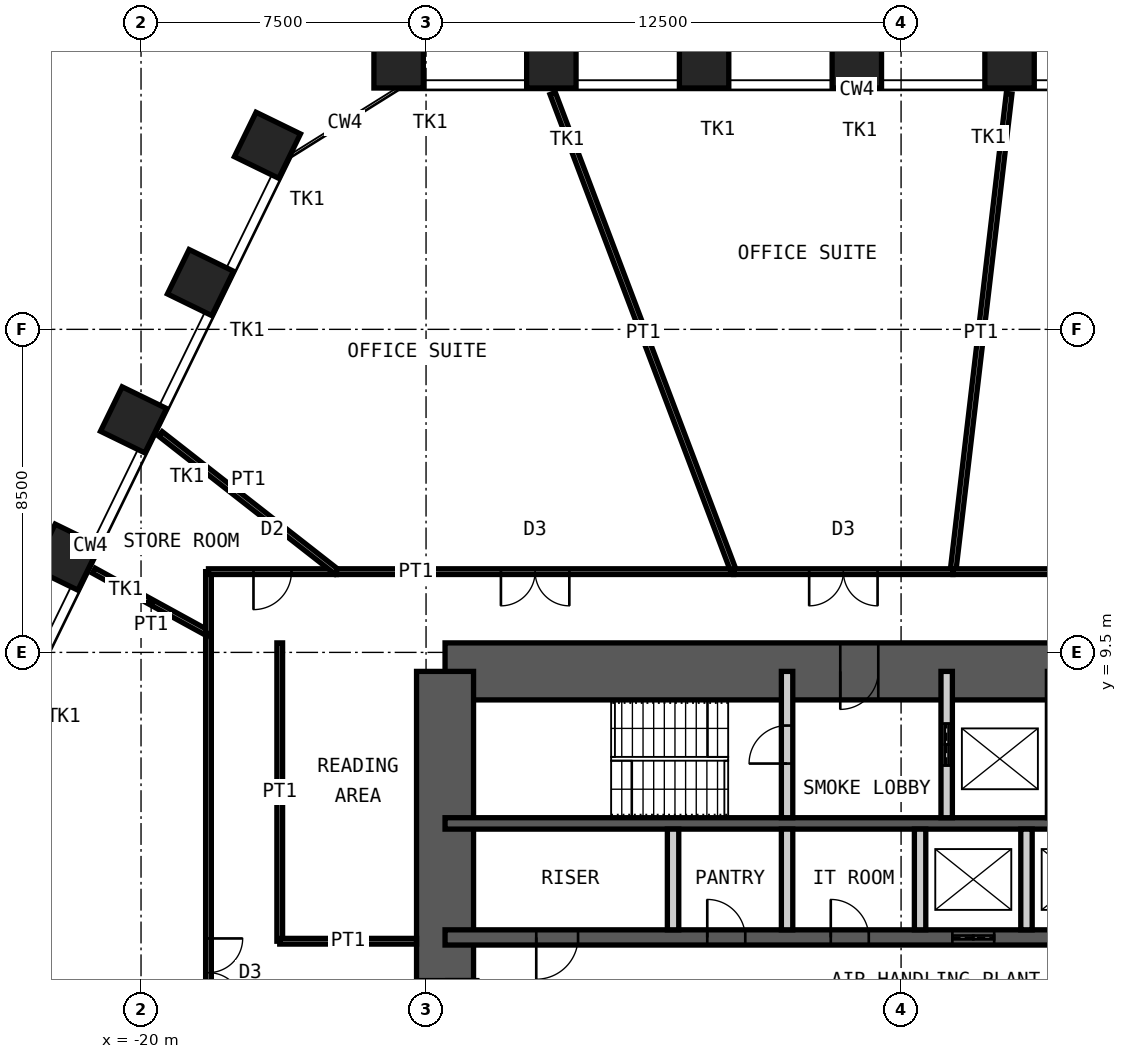
"""IFC4 building model, lengths in metres.
Left out: names, types, materials, properties, quantities, classifications, styles, units other than length and angle.
Written with IfcOpenShell. Run it as: python <this file> out.ifc"""

import sys

from ifc_helpers import new_model, si_unit, direction, frame, frame_2d, origin, origin_2d, place, context, subcontext, project, spatial, rectangle, hollow_rectangle, extrude, element, fill, save


model = new_model("IFC4")
c1 = context("Model", 3, precision=1e-05, world=origin(), true_north=direction((0.0, 1.0)))
c2 = subcontext(c1, "Body", "Model", "MODEL_VIEW")
j1 = project(units=[si_unit("LENGTHUNIT", "METRE"), si_unit("PLANEANGLEUNIT", "RADIAN")], contexts=[c1])
p1 = place(None, origin())
s1 = spatial("IfcSite", under=j1, at=p1, CompositionType="ELEMENT")
p2 = place(p1, origin())
s2 = spatial("IfcBuilding", under=s1, at=p2, CompositionType="ELEMENT")
p3 = place(p2, frame((0.0, 0.0, 170.2)))
s3 = spatial("IfcBuildingStorey", under=s2, at=p3, CompositionType="ELEMENT", Elevation=170.2)
for number, where, z_axis, x_axis in (
    (1, (-13.222, 25.0, 0.0), (0.0, 0.0, 1.0), (-1.0, 0.0, 0.0)),
    (2, (-9.203, 25.0, 0.0), (0.0, 0.0, 1.0), (-1.0, 0.0, 0.0)),
    (3, (-5.184, 25.0, 0.0), (0.0, 0.0, 1.0), (-1.0, 0.0, 0.0)),
    (4, (-1.165, 25.0, 0.0), (0.0, 0.0, 1.0), (-1.0, 0.0, 0.0)),
    (5, (2.854, 25.0, 0.0), (0.0, 0.0, 1.0), (-1.0, 0.0, 0.0)),
    (6, (-21.959, 12.006, 0.0), (0.0, 0.0, 1.0), (-0.438, -0.899, 0.0)),
    (7, (-20.198, 15.618, 0.0), (0.0, 0.0, 1.0), (-0.438, -0.899, 0.0)),
    (8, (-18.436, 19.23, 0.0), (0.0, 0.0, 1.0), (-0.438, -0.899, 0.0)),
    (9, (-16.674, 22.843, 0.0), (0.0, 0.0, 1.0), (-0.438, -0.899, 0.0)),
):
    element("IfcColumn", number, at=place(p3, frame(where, z_axis=z_axis, x_axis=x_axis)), inside=s3, PredefinedType="COLUMN", context=c2, shape_type="SweptSolid", body=[
        extrude(hollow_rectangle(XDim=1.3, YDim=1.3, WallThickness=0.1, at=origin_2d()), origin(), (0.0, 0.0, 1.0), 4.2),
    ])
p4 = place(p3, frame((-12.0, 9.0, 0.0), z_axis=(0.0, 0.0, 1.0), x_axis=(1.0, 0.0, 0.0)))
e10 = element("IfcWall", 10, at=p4, inside=s3, PredefinedType="SHEAR", context=c2, shape_type="SweptSolid", body=[
    extrude(rectangle(XDim=24.0, YDim=1.5, at=frame_2d((12.0, 0.0))), origin(), (0.0, 0.0, 1.0), 4.2),
])
p5 = place(p4, frame((10.4, 0.0, 0.0)))
e11 = element("IfcOpeningElement", 11, at=p5, cuts=e10, PredefinedType="OPENING", context=c2, shape_type="SweptSolid", body=[
    extrude(rectangle(XDim=1.0, YDim=2.1, at=frame_2d((0.5, 1.05))), frame((0.0, 0.76, 0.0), z_axis=(0.0, -1.0, 0.0), x_axis=(1.0, 0.0, 0.0)), (0.0, 0.0, 1.0), 1.52),
])
p6 = place(p4, frame((17.6, 0.0, 0.0)))
e12 = element("IfcOpeningElement", 12, at=p6, cuts=e10, PredefinedType="OPENING", context=c2, shape_type="SweptSolid", body=[
    extrude(rectangle(XDim=0.9, YDim=2.1, at=frame_2d((0.45, 1.05))), frame((0.0, 0.76, 0.0), z_axis=(0.0, -1.0, 0.0), x_axis=(1.0, 0.0, 0.0)), (0.0, 0.0, 1.0), 1.52),
])
p7 = place(p4, frame((21.9, 0.0, 0.0)))
e13 = element("IfcOpeningElement", 13, at=p7, cuts=e10, PredefinedType="OPENING", context=c2, shape_type="SweptSolid", body=[
    extrude(rectangle(XDim=0.9, YDim=2.1, at=frame_2d((0.45, 1.05))), frame((0.0, 0.76, 0.0), z_axis=(0.0, -1.0, 0.0), x_axis=(1.0, 0.0, 0.0)), (0.0, 0.0, 1.0), 1.52),
])
p8 = place(p3, frame((-12.0, -9.0, 0.0), z_axis=(0.0, 0.0, 1.0), x_axis=(0.0, 1.0, 0.0)))
e14 = element("IfcWall", 14, at=p8, inside=s3, PredefinedType="SHEAR", context=c2, shape_type="SweptSolid", body=[
    extrude(rectangle(XDim=18.0, YDim=1.5, at=frame_2d((9.0, 0.0))), origin(), (0.0, 0.0, 1.0), 4.2),
])
p9 = place(p8, frame((8.1, 0.0, 0.0)))
e15 = element("IfcOpeningElement", 15, at=p9, cuts=e14, PredefinedType="OPENING", context=c2, shape_type="SweptSolid", body=[
    extrude(rectangle(XDim=1.8, YDim=2.1, at=frame_2d((0.9, 1.05))), frame((0.0, 0.76, 0.0), z_axis=(0.0, -1.0, 0.0), x_axis=(1.0, 0.0, 0.0)), (0.0, 0.0, 1.0), 1.52),
])
p10 = place(p3, frame((-12.0, 5.0, 0.0), z_axis=(0.0, 0.0, 1.0), x_axis=(1.0, 0.0, 0.0)))
e16 = element("IfcWall", 16, at=p10, inside=s3, PredefinedType="SHEAR", context=c2, shape_type="SweptSolid", body=[
    extrude(rectangle(XDim=24.0, YDim=0.3, at=frame_2d((12.0, 0.0))), origin(), (0.0, 0.0, 1.0), 4.2),
])
p11 = place(p3, frame((-12.0, 2.0, 0.0), z_axis=(0.0, 0.0, 1.0), x_axis=(1.0, 0.0, 0.0)))
e17 = element("IfcWall", 17, at=p11, inside=s3, PredefinedType="SHEAR", context=c2, shape_type="SweptSolid", body=[
    extrude(rectangle(XDim=24.0, YDim=0.4, at=frame_2d((12.0, 0.0))), origin(), (0.0, 0.0, 1.0), 4.2),
])
p12 = place(p11, frame((2.4, 0.0, 0.0)))
e18 = element("IfcOpeningElement", 18, at=p12, cuts=e17, PredefinedType="OPENING", context=c2, shape_type="SweptSolid", body=[
    extrude(rectangle(XDim=1.1, YDim=2.1, at=frame_2d((0.55, 1.05))), frame((0.0, 0.21, 0.0), z_axis=(0.0, -1.0, 0.0), x_axis=(1.0, 0.0, 0.0)), (0.0, 0.0, 1.0), 0.42),
])
p13 = place(p11, frame((22.0, 0.0, 0.0)))
e19 = element("IfcOpeningElement", 19, at=p13, cuts=e17, PredefinedType="OPENING", context=c2, shape_type="SweptSolid", body=[
    extrude(rectangle(XDim=1.1, YDim=2.1, at=frame_2d((0.55, 1.05))), frame((0.0, 0.21, 0.0), z_axis=(0.0, -1.0, 0.0), x_axis=(1.0, 0.0, 0.0)), (0.0, 0.0, 1.0), 0.42),
])
p14 = place(p11, frame((10.15, 0.0, 0.0)))
e20 = element("IfcOpeningElement", 20, at=p14, cuts=e17, PredefinedType="OPENING", context=c2, shape_type="SweptSolid", body=[
    extrude(rectangle(XDim=1.0, YDim=2.1, at=frame_2d((0.5, 1.05))), frame((0.0, 0.21, 0.0), z_axis=(0.0, -1.0, 0.0), x_axis=(1.0, 0.0, 0.0)), (0.0, 0.0, 1.0), 0.42),
])
p15 = place(p11, frame((6.9, 0.0, 0.0)))
e21 = element("IfcOpeningElement", 21, at=p15, cuts=e17, PredefinedType="OPENING", context=c2, shape_type="SweptSolid", body=[
    extrude(rectangle(XDim=1.0, YDim=2.1, at=frame_2d((0.5, 1.05))), frame((0.0, 0.21, 0.0), z_axis=(0.0, -1.0, 0.0), x_axis=(1.0, 0.0, 0.0)), (0.0, 0.0, 1.0), 0.42),
])
p16 = place(p11, frame((13.35, 0.0, 0.0)))
e22 = element("IfcOpeningElement", 22, at=p16, cuts=e17, PredefinedType="OPENING", context=c2, shape_type="SweptSolid", body=[
    extrude(rectangle(XDim=1.1, YDim=2.4, at=frame_2d((0.55, 1.2))), frame((0.0, 0.21, 0.0), z_axis=(0.0, -1.0, 0.0), x_axis=(1.0, 0.0, 0.0)), (0.0, 0.0, 1.0), 0.42),
])
p17 = place(p11, frame((16.15, 0.0, 0.0)))
e23 = element("IfcOpeningElement", 23, at=p17, cuts=e17, PredefinedType="OPENING", context=c2, shape_type="SweptSolid", body=[
    extrude(rectangle(XDim=1.1, YDim=2.4, at=frame_2d((0.55, 1.2))), frame((0.0, 0.21, 0.0), z_axis=(0.0, -1.0, 0.0), x_axis=(1.0, 0.0, 0.0)), (0.0, 0.0, 1.0), 0.42),
])
p18 = place(p11, frame((18.95, 0.0, 0.0)))
e24 = element("IfcOpeningElement", 24, at=p18, cuts=e17, PredefinedType="OPENING", context=c2, shape_type="SweptSolid", body=[
    extrude(rectangle(XDim=1.1, YDim=2.4, at=frame_2d((0.55, 1.2))), frame((0.0, 0.21, 0.0), z_axis=(0.0, -1.0, 0.0), x_axis=(1.0, 0.0, 0.0)), (0.0, 0.0, 1.0), 0.42),
])
p19 = place(p3, frame((-3.0, 5.15, 0.0), z_axis=(0.0, 0.0, 1.0), x_axis=(0.0, 1.0, 0.0)))
e25 = element("IfcWall", 25, at=p19, inside=s3, PredefinedType="PARTITIONING", context=c2, shape_type="SweptSolid", body=[
    extrude(rectangle(XDim=3.85, YDim=0.3, at=frame_2d((1.925, 0.0))), origin(), (0.0, 0.0, 1.0), 3.98),
])
p20 = place(p19, frame((1.425, 0.0, 0.0)))
e26 = element("IfcOpeningElement", 26, at=p20, cuts=e25, PredefinedType="OPENING", context=c2, shape_type="SweptSolid", body=[
    extrude(rectangle(XDim=1.0, YDim=2.1, at=frame_2d((0.5, 1.05))), frame((0.0, 0.16, 0.0), z_axis=(0.0, -1.0, 0.0), x_axis=(1.0, 0.0, 0.0)), (0.0, 0.0, 1.0), 0.32),
])
p21 = place(p3, frame((1.2, 5.15, 0.0), z_axis=(0.0, 0.0, 1.0), x_axis=(0.0, 1.0, 0.0)))
e27 = element("IfcWall", 27, at=p21, inside=s3, PredefinedType="PARTITIONING", context=c2, shape_type="SweptSolid", body=[
    extrude(rectangle(XDim=3.85, YDim=0.3, at=frame_2d((1.925, 0.0))), origin(), (0.0, 0.0, 1.0), 3.98),
])
p22 = place(p21, frame((1.375, 0.0, 0.0)))
e28 = element("IfcOpeningElement", 28, at=p22, cuts=e27, PredefinedType="OPENING", context=c2, shape_type="SweptSolid", body=[
    extrude(rectangle(XDim=1.1, YDim=2.4, at=frame_2d((0.55, 1.2))), frame((0.0, 0.16, 0.0), z_axis=(0.0, -1.0, 0.0), x_axis=(1.0, 0.0, 0.0)), (0.0, 0.0, 1.0), 0.32),
])
p23 = place(p3, frame((4.0, 5.15, 0.0), z_axis=(0.0, 0.0, 1.0), x_axis=(0.0, 1.0, 0.0)))
e29 = element("IfcWall", 29, at=p23, inside=s3, PredefinedType="PARTITIONING", context=c2, shape_type="SweptSolid", body=[
    extrude(rectangle(XDim=3.85, YDim=0.3, at=frame_2d((1.925, 0.0))), origin(), (0.0, 0.0, 1.0), 3.98),
])
for number, where, z_axis, x_axis in (
    (30, (-6.0, 2.2, 0.0), (0.0, 0.0, 1.0), (0.0, 1.0, 0.0)),
    (31, (-3.0, 2.2, 0.0), (0.0, 0.0, 1.0), (0.0, 1.0, 0.0)),
    (32, (0.5, 2.2, 0.0), (0.0, 0.0, 1.0), (0.0, 1.0, 0.0)),
    (33, (3.3, 2.2, 0.0), (0.0, 0.0, 1.0), (0.0, 1.0, 0.0)),
):
    element("IfcWall", number, at=place(p3, frame(where, z_axis=z_axis, x_axis=x_axis)), inside=s3, PredefinedType="PARTITIONING", context=c2, shape_type="SweptSolid", body=[
        extrude(rectangle(XDim=2.65, YDim=0.3, at=frame_2d((1.325, 0.0))), origin(), (0.0, 0.0, 1.0), 3.98),
    ])
p24 = place(p3, frame((2.843, 24.201, 0.0), z_axis=(0.0, 0.0, 1.0), x_axis=(-0.116670084723, -0.993170726175, 0.0)))
e34 = element("IfcWall", 34, at=p24, inside=s3, PredefinedType="PARTITIONING", context=c2, shape_type="SweptSolid", body=[
    extrude(rectangle(XDim=12.662, YDim=0.15, at=frame_2d((6.331, 0.0))), origin(), (0.0, 0.0, 1.0), 2.72),
])
p25 = place(p3, frame((1.366, 11.625, 0.0), z_axis=(0.0, 0.0, 1.0), x_axis=(1.0, 0.0, 0.0)))
e35 = element("IfcWall", 35, at=p25, inside=s3, PredefinedType="PARTITIONING", context=c2, shape_type="SweptSolid", body=[
    extrude(rectangle(XDim=8.46, YDim=0.15, at=frame_2d((4.23, 0.0))), origin(), (0.0, 0.0, 1.0), 3.92),
])
p26 = place(p25, frame((3.33, 0.0, 0.0)))
e36 = element("IfcOpeningElement", 36, at=p26, cuts=e35, PredefinedType="OPENING", context=c2, shape_type="SweptSolid", body=[
    extrude(rectangle(XDim=1.8, YDim=2.4, at=frame_2d((0.9, 1.2))), frame((0.0, 0.085, 0.0), z_axis=(0.0, -1.0, 0.0), x_axis=(1.0, 0.0, 0.0)), (0.0, 0.0, 1.0), 0.17),
])
p27 = place(p3, frame((-18.225, -7.849, 0.0), z_axis=(0.0, 0.0, 1.0), x_axis=(0.0, 1.0, 0.0)))
e37 = element("IfcWall", 37, at=p27, inside=s3, PredefinedType="PARTITIONING", context=c2, shape_type="SweptSolid", body=[
    extrude(rectangle(XDim=17.845, YDim=0.15, at=frame_2d((8.922, 0.0))), origin(), (0.0, 0.0, 1.0), 3.92),
])
p28 = place(p27, frame((8.022, 0.0, 0.0)))
e38 = element("IfcOpeningElement", 38, at=p28, cuts=e37, PredefinedType="OPENING", context=c2, shape_type="SweptSolid", body=[
    extrude(rectangle(XDim=1.8, YDim=2.4, at=frame_2d((0.9, 1.2))), frame((0.0, 0.085, 0.0), z_axis=(0.0, -1.0, 0.0), x_axis=(1.0, 0.0, 0.0)), (0.0, 0.0, 1.0), 0.17),
])
p29 = place(p3, frame((-21.242, 11.651, 0.0), z_axis=(0.0, 0.0, 1.0), x_axis=(0.876768023831, -0.480913539409, 0.0)))
e39 = element("IfcWall", 39, at=p29, inside=s3, PredefinedType="PARTITIONING", context=c2, shape_type="SweptSolid", body=[
    extrude(rectangle(XDim=3.441, YDim=0.15, at=frame_2d((1.721, 0.0))), origin(), (0.0, 0.0, 1.0), 2.72),
])
p30 = place(p3, frame((-18.225, 9.996, 0.0), z_axis=(0.0, 0.0, 1.0), x_axis=(0.0, 1.0, 0.0)))
e40 = element("IfcWall", 40, at=p30, inside=s3, PredefinedType="PARTITIONING", context=c2, shape_type="SweptSolid", body=[
    extrude(rectangle(XDim=1.629, YDim=0.15, at=frame_2d((0.814, 0.0))), origin(), (0.0, 0.0, 1.0), 3.92),
])
p31 = place(p3, frame((-18.225, 11.625, 0.0), z_axis=(0.0, 0.0, 1.0), x_axis=(1.0, 0.0, 0.0)))
e41 = element("IfcWall", 41, at=p31, inside=s3, PredefinedType="PARTITIONING", context=c2, shape_type="SweptSolid", body=[
    extrude(rectangle(XDim=3.368, YDim=0.15, at=frame_2d((1.684, 0.0))), origin(), (0.0, 0.0, 1.0), 3.92),
])
p32 = place(p31, frame((1.184, 0.0, 0.0)))
e42 = element("IfcOpeningElement", 42, at=p32, cuts=e41, PredefinedType="OPENING", context=c2, shape_type="SweptSolid", body=[
    extrude(rectangle(XDim=1.0, YDim=2.4, at=frame_2d((0.5, 1.2))), frame((0.0, 0.085, 0.0), z_axis=(0.0, -1.0, 0.0), x_axis=(1.0, 0.0, 0.0)), (0.0, 0.0, 1.0), 0.17),
])
p33 = place(p3, frame((-19.49, 15.25, 0.0), z_axis=(0.0, 0.0, 1.0), x_axis=(0.787549668605, -0.616251182133, 0.0)))
e43 = element("IfcWall", 43, at=p33, inside=s3, PredefinedType="PARTITIONING", context=c2, shape_type="SweptSolid", body=[
    extrude(rectangle(XDim=5.882, YDim=0.15, at=frame_2d((2.941, 0.0))), origin(), (0.0, 0.0, 1.0), 2.72),
])
p34 = place(p3, frame((-14.857, 11.625, 0.0), z_axis=(0.0, 0.0, 1.0), x_axis=(1.0, 0.0, 0.0)))
e44 = element("IfcWall", 44, at=p34, inside=s3, PredefinedType="PARTITIONING", context=c2, shape_type="SweptSolid", body=[
    extrude(rectangle(XDim=10.455, YDim=0.15, at=frame_2d((5.227, 0.0))), origin(), (0.0, 0.0, 1.0), 3.92),
])
p35 = place(p34, frame((4.327, 0.0, 0.0)))
e45 = element("IfcOpeningElement", 45, at=p35, cuts=e44, PredefinedType="OPENING", context=c2, shape_type="SweptSolid", body=[
    extrude(rectangle(XDim=1.8, YDim=2.4, at=frame_2d((0.9, 1.2))), frame((0.0, 0.085, 0.0), z_axis=(0.0, -1.0, 0.0), x_axis=(1.0, 0.0, 0.0)), (0.0, 0.0, 1.0), 0.17),
])
p36 = place(p3, frame((-9.167, 24.207, 0.0), z_axis=(0.0, 0.0, 1.0), x_axis=(0.354156368181, -0.935186220427, 0.0)))
e46 = element("IfcWall", 46, at=p36, inside=s3, PredefinedType="PARTITIONING", context=c2, shape_type="SweptSolid", body=[
    extrude(rectangle(XDim=13.454, YDim=0.15, at=frame_2d((6.727, 0.0))), origin(), (0.0, 0.0, 1.0), 2.72),
])
p37 = place(p3, frame((-4.403, 11.625, 0.0), z_axis=(0.0, 0.0, 1.0), x_axis=(1.0, 0.0, 0.0)))
e47 = element("IfcWall", 47, at=p37, inside=s3, PredefinedType="PARTITIONING", context=c2, shape_type="SweptSolid", body=[
    extrude(rectangle(XDim=5.768, YDim=0.15, at=frame_2d((2.884, 0.0))), origin(), (0.0, 0.0, 1.0), 3.92),
])
p38 = place(p37, frame((1.984, 0.0, 0.0)))
e48 = element("IfcOpeningElement", 48, at=p38, cuts=e47, PredefinedType="OPENING", context=c2, shape_type="SweptSolid", body=[
    extrude(rectangle(XDim=1.8, YDim=2.4, at=frame_2d((0.9, 1.2))), frame((0.0, 0.085, 0.0), z_axis=(0.0, -1.0, 0.0), x_axis=(1.0, 0.0, 0.0)), (0.0, 0.0, 1.0), 0.17),
])
p39 = place(p3, frame((-16.35, 1.9, 0.0), z_axis=(0.0, 0.0, 1.0), x_axis=(0.0, 1.0, 0.0)))
e49 = element("IfcWall", 49, at=p39, inside=s3, PredefinedType="PARTITIONING", context=c2, shape_type="SweptSolid", body=[
    extrude(rectangle(XDim=7.85, YDim=0.15, at=frame_2d((3.925, 0.0))), origin(), (0.0, 0.0, 1.0), 3.92),
])
p40 = place(p3, frame((-12.75, 1.9, 0.0), z_axis=(0.0, 0.0, 1.0), x_axis=(-1.0, 0.0, 0.0)))
e50 = element("IfcWall", 50, at=p40, inside=s3, PredefinedType="PARTITIONING", context=c2, shape_type="SweptSolid", body=[
    extrude(rectangle(XDim=3.6, YDim=0.15, at=frame_2d((1.8, 0.0))), origin(), (0.0, 0.0, 1.0), 2.72),
])
p41 = place(p5, origin())
e51 = element("IfcDoor", 51, at=p41, inside=s3, OperationType="SINGLE_SWING_LEFT", PredefinedType="DOOR", context=c2, shape_type="SweptSolid", body=[
    extrude(rectangle(XDim=1.0, YDim=2.1, at=frame_2d((0.5, 1.05))), frame((0.0, 0.025, 0.0), z_axis=(0.0, -1.0, 0.0), x_axis=(1.0, 0.0, 0.0)), (0.0, 0.0, 1.0), 0.05),
])
fill(e11, e51)
p42 = place(p20, origin())
e52 = element("IfcDoor", 52, at=p42, inside=s3, OperationType="SINGLE_SWING_RIGHT", PredefinedType="DOOR", context=c2, shape_type="SweptSolid", body=[
    extrude(rectangle(XDim=1.0, YDim=2.1, at=frame_2d((0.5, 1.05))), frame((0.0, 0.025, 0.0), z_axis=(0.0, -1.0, 0.0), x_axis=(1.0, 0.0, 0.0)), (0.0, 0.0, 1.0), 0.05),
])
fill(e26, e52)
p43 = place(p12, origin())
e53 = element("IfcDoor", 53, at=p43, inside=s3, OperationType="SINGLE_SWING_LEFT", PredefinedType="DOOR", context=c2, shape_type="SweptSolid", body=[
    extrude(rectangle(XDim=1.1, YDim=2.1, at=frame_2d((0.55, 1.05))), frame((0.0, 0.025, 0.0), z_axis=(0.0, -1.0, 0.0), x_axis=(1.0, 0.0, 0.0)), (0.0, 0.0, 1.0), 0.05),
])
fill(e18, e53)
p44 = place(p14, origin())
e54 = element("IfcDoor", 54, at=p44, inside=s3, OperationType="SINGLE_SWING_RIGHT", PredefinedType="DOOR", context=c2, shape_type="SweptSolid", body=[
    extrude(rectangle(XDim=1.0, YDim=2.1, at=frame_2d((0.5, 1.05))), frame((0.0, 0.025, 0.0), z_axis=(0.0, -1.0, 0.0), x_axis=(1.0, 0.0, 0.0)), (0.0, 0.0, 1.0), 0.05),
])
fill(e20, e54)
p45 = place(p9, origin())
e55 = element("IfcDoor", 55, at=p45, inside=s3, OperationType="DOUBLE_DOOR_DOUBLE_SWING", PredefinedType="DOOR", context=c2, shape_type="SweptSolid", body=[
    extrude(rectangle(XDim=1.8, YDim=2.1, at=frame_2d((0.9, 1.05))), frame((0.0, 0.025, 0.0), z_axis=(0.0, -1.0, 0.0), x_axis=(1.0, 0.0, 0.0)), (0.0, 0.0, 1.0), 0.05),
])
fill(e15, e55)
p46 = place(p22, origin())
e56 = element("IfcDoor", 56, at=p46, inside=s3, OperationType="DOUBLE_DOOR_SLIDING", PredefinedType="DOOR", context=c2, shape_type="SweptSolid", body=[
    extrude(rectangle(XDim=1.1, YDim=2.4, at=frame_2d((0.55, 1.2))), frame((0.0, 0.025, 0.0), z_axis=(0.0, -1.0, 0.0), x_axis=(1.0, 0.0, 0.0)), (0.0, 0.0, 1.0), 0.05),
])
fill(e28, e56)
p47 = place(p15, origin())
e57 = element("IfcDoor", 57, at=p47, inside=s3, OperationType="SINGLE_SWING_RIGHT", PredefinedType="DOOR", context=c2, shape_type="SweptSolid", body=[
    extrude(rectangle(XDim=1.0, YDim=2.1, at=frame_2d((0.5, 1.05))), frame((0.0, 0.025, 0.0), z_axis=(0.0, -1.0, 0.0), x_axis=(1.0, 0.0, 0.0)), (0.0, 0.0, 1.0), 0.05),
])
fill(e21, e57)
p48 = place(p16, origin())
e58 = element("IfcDoor", 58, at=p48, inside=s3, OperationType="DOUBLE_DOOR_SLIDING", PredefinedType="DOOR", context=c2, shape_type="SweptSolid", body=[
    extrude(rectangle(XDim=1.1, YDim=2.4, at=frame_2d((0.55, 1.2))), frame((0.0, 0.025, 0.0), z_axis=(0.0, -1.0, 0.0), x_axis=(1.0, 0.0, 0.0)), (0.0, 0.0, 1.0), 0.05),
])
fill(e22, e58)
p49 = place(p28, origin())
e59 = element("IfcDoor", 59, at=p49, inside=s3, OperationType="DOUBLE_DOOR_DOUBLE_SWING", PredefinedType="DOOR", context=c2, shape_type="SweptSolid", body=[
    extrude(rectangle(XDim=1.8, YDim=2.4, at=frame_2d((0.9, 1.2))), frame((0.0, 0.025, 0.0), z_axis=(0.0, -1.0, 0.0), x_axis=(1.0, 0.0, 0.0)), (0.0, 0.0, 1.0), 0.05),
])
fill(e38, e59)
p50 = place(p32, origin())
e60 = element("IfcDoor", 60, at=p50, inside=s3, OperationType="SINGLE_SWING_LEFT", PredefinedType="DOOR", context=c2, shape_type="SweptSolid", body=[
    extrude(rectangle(XDim=1.0, YDim=2.4, at=frame_2d((0.5, 1.2))), frame((0.0, 0.025, 0.0), z_axis=(0.0, -1.0, 0.0), x_axis=(1.0, 0.0, 0.0)), (0.0, 0.0, 1.0), 0.05),
])
fill(e42, e60)
p51 = place(p35, origin())
e61 = element("IfcDoor", 61, at=p51, inside=s3, OperationType="DOUBLE_DOOR_DOUBLE_SWING", PredefinedType="DOOR", context=c2, shape_type="SweptSolid", body=[
    extrude(rectangle(XDim=1.8, YDim=2.4, at=frame_2d((0.9, 1.2))), frame((0.0, 0.025, 0.0), z_axis=(0.0, -1.0, 0.0), x_axis=(1.0, 0.0, 0.0)), (0.0, 0.0, 1.0), 0.05),
])
fill(e45, e61)
p52 = place(p38, origin())
e62 = element("IfcDoor", 62, at=p52, inside=s3, OperationType="DOUBLE_DOOR_DOUBLE_SWING", PredefinedType="DOOR", context=c2, shape_type="SweptSolid", body=[
    extrude(rectangle(XDim=1.8, YDim=2.4, at=frame_2d((0.9, 1.2))), frame((0.0, 0.025, 0.0), z_axis=(0.0, -1.0, 0.0), x_axis=(1.0, 0.0, 0.0)), (0.0, 0.0, 1.0), 0.05),
])
fill(e48, e62)
save(model, sys.argv[1])
